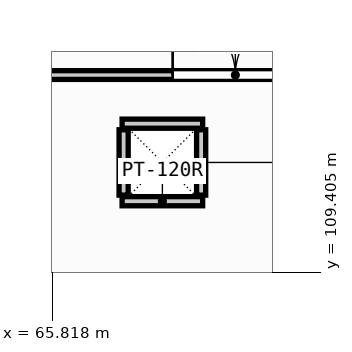
"""IFC4 building model, lengths in metres.
Left out: names, types, materials, properties, quantities, classifications, styles, units other than length and angle.
Written with IfcOpenShell. Run it as: python <this file> out.ifc"""

import sys

from ifc_helpers import new_model, si_unit, direction, frame, frame_2d, origin, place, context, subcontext, project, spatial, rectangle, extrude, element, fill, save


model = new_model("IFC4")
c1 = context("Model", 3, precision=1e-05, world=origin(), true_north=direction((0.0, 1.0)))
c2 = subcontext(c1, "Body", "Model", "MODEL_VIEW")
j1 = project(units=[si_unit("LENGTHUNIT", "METRE"), si_unit("PLANEANGLEUNIT", "RADIAN")], contexts=[c1])
p1 = place(None, origin())
s1 = spatial("IfcSite", under=j1, at=p1, CompositionType="ELEMENT")
p2 = place(p1, origin())
s2 = spatial("IfcBuilding", under=s1, at=p2, CompositionType="ELEMENT")
p3 = place(p2, frame((0.0, 0.0, 13.2)))
s3 = spatial("IfcBuildingStorey", under=s2, at=p3, CompositionType="ELEMENT", Elevation=13.2)
for number, where, z_axis, x_axis in (
    (1, (66.74, 110.34, 0.0), (0.0, 0.0, 1.0), (1.0, 0.0, 0.0)),
    (2, (66.74, 111.36, 0.0), (0.0, 0.0, 1.0), (1.0, 0.0, 0.0)),
):
    element("IfcWall", number, at=place(p3, frame(where, z_axis=z_axis, x_axis=x_axis)), inside=s3, PredefinedType="PARTITIONING", context=c2, shape_type="SweptSolid", body=[
        extrude(rectangle(XDim=1.06, YDim=0.12, at=frame_2d((0.53, 0.0))), origin(), (0.0, 0.0, 1.0), 2.95),
    ])
for number, where, z_axis, x_axis in (
    (3, (66.76, 110.42, 0.0), (0.0, 0.0, 1.0), (0.0, 1.0, 0.0)),
    (4, (67.78, 110.42, 0.0), (0.0, 0.0, 1.0), (0.0, 1.0, 0.0)),
):
    element("IfcWall", number, at=place(p3, frame(where, z_axis=z_axis, x_axis=x_axis)), inside=s3, PredefinedType="PARTITIONING", context=c2, shape_type="SweptSolid", body=[
        extrude(rectangle(XDim=0.86, YDim=0.12, at=frame_2d((0.43, 0.0))), origin(), (0.0, 0.0, 1.0), 2.95),
    ])
p4 = place(p3, frame((64.54, 112.0, 0.0), z_axis=(0.0, 0.0, 1.0), x_axis=(1.0, 0.0, 0.0)))
e5 = element("IfcWall", 5, at=p4, inside=s3, PredefinedType="PARTITIONING", context=c2, shape_type="SweptSolid", body=[
    extrude(rectangle(XDim=7.38, YDim=0.115, at=frame_2d((3.69, 0.0))), origin(), (0.0, 0.0, 1.0), 2.75),
])
p5 = place(p4, frame((2.865, 0.0, 0.0)))
e6 = element("IfcOpeningElement", 6, at=p5, cuts=e5, PredefinedType="OPENING", context=c2, shape_type="SweptSolid", body=[
    extrude(rectangle(XDim=1.65, YDim=2.25, at=frame_2d((0.825, 1.125))), frame((0.0, 0.067, 0.0), z_axis=(0.0, -1.0, 0.0), x_axis=(1.0, 0.0, 0.0)), (0.0, 0.0, 1.0), 0.135),
])
p6 = place(p5, origin())
e7 = element("IfcDoor", 7, at=p6, inside=s3, OperationType="DOUBLE_DOOR_SINGLE_SWING", PredefinedType="DOOR", context=c2, shape_type="SweptSolid", body=[
    extrude(rectangle(XDim=1.65, YDim=2.25, at=frame_2d((0.825, 1.125))), frame((0.0, 0.025, 0.0), z_axis=(0.0, -1.0, 0.0), x_axis=(1.0, 0.0, 0.0)), (0.0, 0.0, 1.0), 0.05),
])
fill(e6, e7)
save(model, sys.argv[1])
